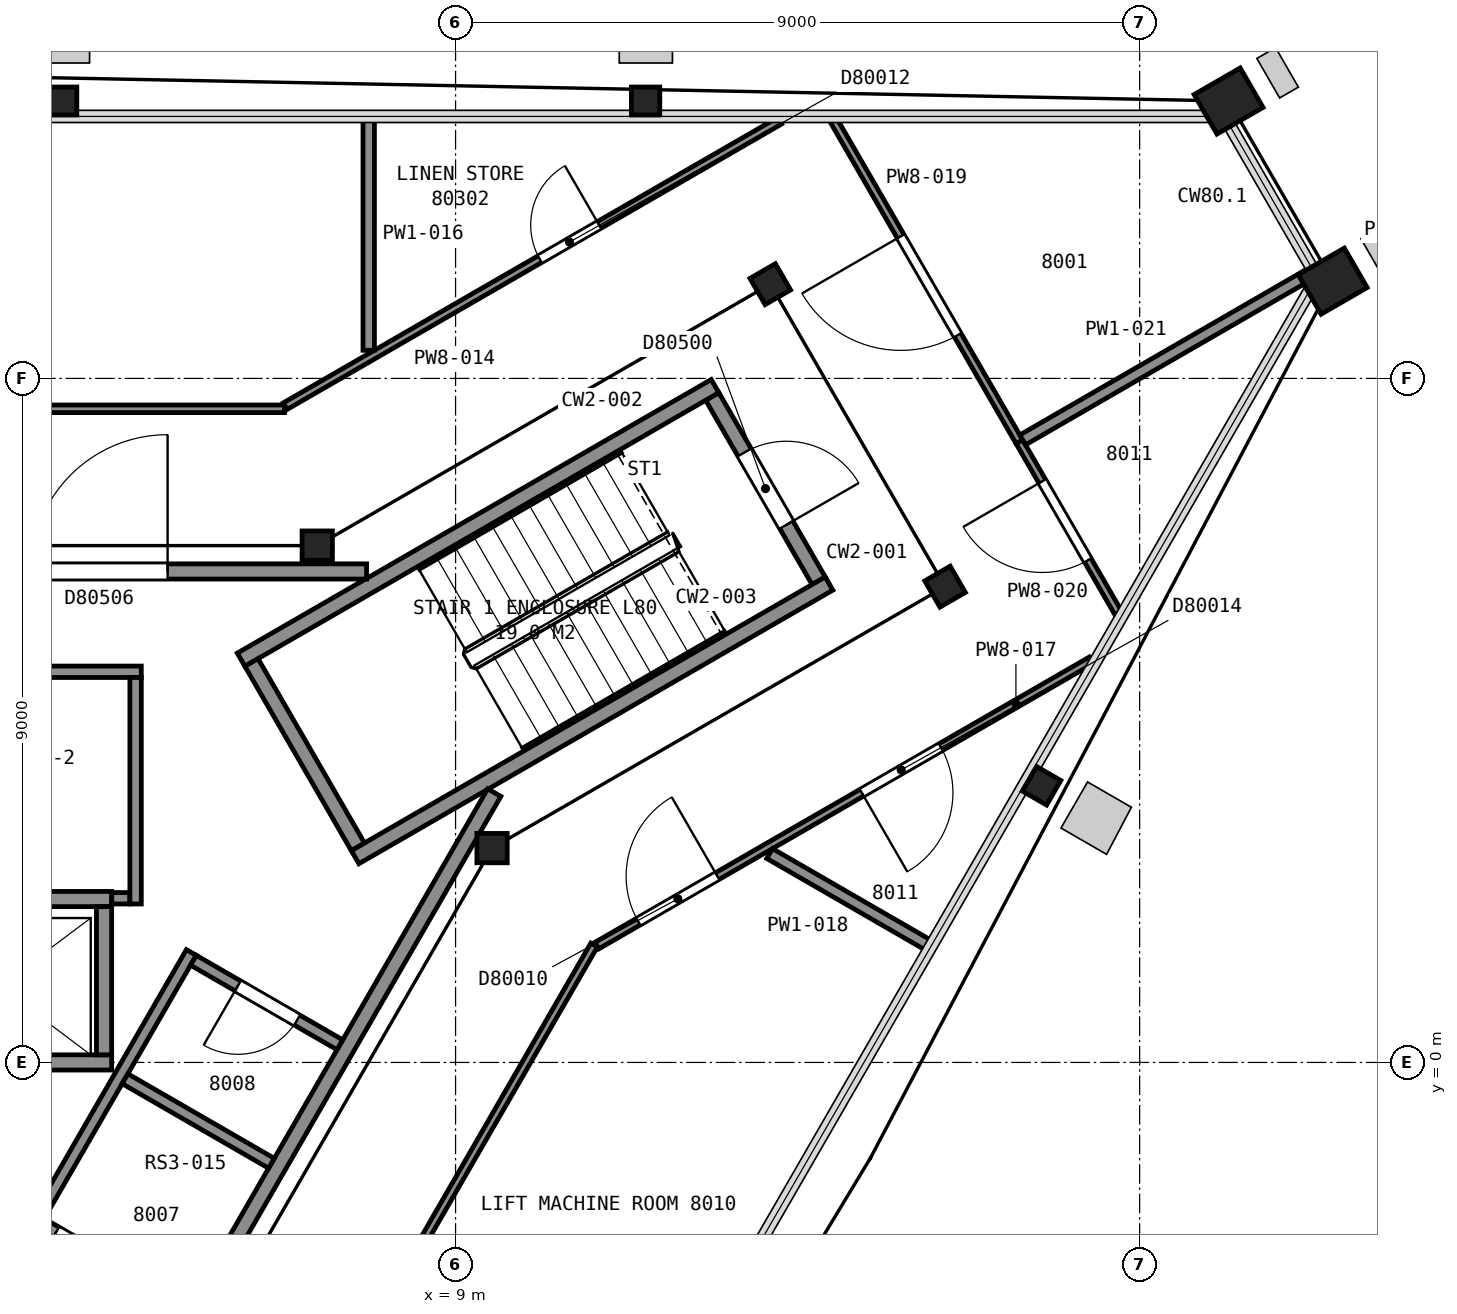
"""IFC4 building model, lengths in metres.
Left out: names, types, materials, properties, quantities, classifications, styles, units other than length and angle.
Written with IfcOpenShell. Run it as: python <this file> out.ifc"""

import sys

from ifc_helpers import new_model, si_unit, direction, frame, frame_2d, origin, origin_2d, place, context, subcontext, project, spatial, rectangle, hollow_rectangle, i_section, extrude, element, fill, save


model = new_model("IFC4")
c1 = context("Model", 3, precision=1e-05, world=origin(), true_north=direction((0.0, 1.0)))
c2 = subcontext(c1, "Body", "Model", "MODEL_VIEW")
j1 = project(units=[si_unit("LENGTHUNIT", "METRE"), si_unit("PLANEANGLEUNIT", "RADIAN")], contexts=[c1])
p1 = place(None, origin())
s1 = spatial("IfcSite", under=j1, at=p1, CompositionType="ELEMENT")
p2 = place(p1, origin())
s2 = spatial("IfcBuilding", under=s1, at=p2, CompositionType="ELEMENT")
p3 = place(p2, frame((0.0, 0.0, 316.8)))
s3 = spatial("IfcBuildingStorey", under=s2, at=p3, CompositionType="ELEMENT", Elevation=316.8)
p4 = place(p3, frame((19.17, 12.65, 0.0), z_axis=(0.0, 0.0, 1.0), x_axis=(0.5, -0.866025403784, 0.0)))
e1 = element("IfcColumn", 1, at=p4, inside=s3, PredefinedType="COLUMN", context=c2, shape_type="SweptSolid", body=[
    extrude(hollow_rectangle(XDim=0.6, YDim=0.7, WallThickness=0.04, at=origin_2d()), origin(), (0.0, 0.0, 1.0), 4.2),
])
for number, where, z_axis, x_axis in (
    (2, (11.5, 12.65, 0.0), (0.0, 0.0, 1.0), (1.0, 0.0, 0.0)),
    (3, (3.83, 12.65, 0.0), (0.0, 0.0, 1.0), (1.0, 0.0, 0.0)),
    (4, (16.71, 3.64, 0.0), (0.0, 0.0, 1.0), (-0.5, -0.866, 0.0)),
):
    element("IfcColumn", number, at=place(p3, frame(where, z_axis=z_axis, x_axis=x_axis)), inside=s3, PredefinedType="COLUMN", context=c2, shape_type="SweptSolid", body=[
        extrude(i_section(OverallWidth=0.373, OverallDepth=0.368, WebThickness=0.015, FlangeThickness=0.024, FilletRadius=0.015, at=origin_2d()), origin(), (0.0, 0.0, 1.0), 4.2),
    ])
p5 = place(p3, frame((20.54, 10.28, 0.0), z_axis=(0.0, 0.0, 1.0), x_axis=(0.5, -0.866025403784, 0.0)))
e5 = element("IfcColumn", 5, at=p5, inside=s3, PredefinedType="COLUMN", context=c2, shape_type="SweptSolid", body=[
    extrude(hollow_rectangle(XDim=0.6, YDim=0.7, WallThickness=0.04, at=origin_2d()), origin(), (0.0, 0.0, 1.0), 4.2),
])
for number, where, z_axis, x_axis in (
    (6, (9.48, 2.82, 0.0), (0.0, 0.0, 1.0), (1.0, 0.0, 0.0)),
    (7, (15.44, 6.26, 0.0), (0.0, 0.0, 1.0), (0.5, -0.866, 0.0)),
    (8, (13.14, 10.24, 0.0), (0.0, 0.0, 1.0), (0.5, -0.866, 0.0)),
    (9, (7.18, 6.8, 0.0), (0.0, 0.0, 1.0), (1.0, 0.0, 0.0)),
):
    element("IfcColumn", number, at=place(p3, frame(where, z_axis=z_axis, x_axis=x_axis)), inside=s3, PredefinedType="COLUMN", context=c2, shape_type="SweptSolid", body=[
        extrude(i_section(OverallWidth=0.399, OverallDepth=0.386, WebThickness=0.021, FlangeThickness=0.033, FilletRadius=0.015, at=origin_2d()), origin(), (0.0, 0.0, 1.0), 4.2),
    ])
p6 = place(p3, frame((13.777, 6.338, 0.0), z_axis=(0.0, 0.0, 1.0), x_axis=(-0.500049511043, 0.865996816683, 0.0)))
e10 = element("IfcWall", 10, at=p6, inside=s3, PredefinedType="PARTITIONING", context=c2, shape_type="SweptSolid", body=[
    extrude(rectangle(XDim=2.8, YDim=0.2, at=frame_2d((1.4, 0.0))), origin(), (0.0, 0.0, 1.0), 3.95),
])
p7 = place(p6, frame((0.85, 0.0, 0.0)))
e11 = element("IfcOpeningElement", 11, at=p7, cuts=e10, PredefinedType="OPENING", context=c2, shape_type="SweptSolid", body=[
    extrude(rectangle(XDim=1.1, YDim=2.1, at=frame_2d((0.55, 1.05))), frame((0.0, 0.11, 0.0), z_axis=(0.0, -1.0, 0.0), x_axis=(1.0, 0.0, 0.0)), (0.0, 0.0, 1.0), 0.22),
])
for number, where, z_axis, x_axis in (
    (12, (6.178, 5.299, 0.0), (0.0, 0.0, 1.0), (0.866, 0.5, 0.0)),
    (13, (7.678, 2.701, 0.0), (0.0, 0.0, 1.0), (0.866, 0.5, 0.0)),
):
    element("IfcWall", number, at=place(p3, frame(where, z_axis=z_axis, x_axis=x_axis)), inside=s3, PredefinedType="PARTITIONING", context=c2, shape_type="SweptSolid", body=[
        extrude(rectangle(XDim=7.2, YDim=0.2, at=frame_2d((3.6, 0.0))), origin(), (0.0, 0.0, 1.0), 3.95),
    ])
p8 = place(p3, frame((7.715, 2.838, 0.0), z_axis=(0.0, 0.0, 1.0), x_axis=(-0.500049511043, 0.865996816683, 0.0)))
e14 = element("IfcWall", 14, at=p8, inside=s3, PredefinedType="PARTITIONING", context=c2, shape_type="SweptSolid", body=[
    extrude(rectangle(XDim=2.8, YDim=0.2, at=frame_2d((1.4, 0.0))), origin(), (0.0, 0.0, 1.0), 3.95),
])
p9 = place(p3, frame((1.525, 0.0, 0.0), z_axis=(0.0, 0.0, 1.0), x_axis=(1.0, 0.0, 0.0)))
e15 = element("IfcWall", 15, at=p9, inside=s3, PredefinedType="PARTITIONING", context=c2, shape_type="SweptSolid", body=[
    extrude(rectangle(XDim=2.95, YDim=0.2, at=frame_2d((1.475, 0.0))), origin(), (0.0, 0.0, 1.0), 4.2),
])
p10 = place(p3, frame((1.525, 2.15, 0.0), z_axis=(0.0, 0.0, 1.0), x_axis=(1.0, 0.0, 0.0)))
e16 = element("IfcWall", 16, at=p10, inside=s3, PredefinedType="PARTITIONING", context=c2, shape_type="SweptSolid", body=[
    extrude(rectangle(XDim=2.95, YDim=0.2, at=frame_2d((1.475, 0.0))), origin(), (0.0, 0.0, 1.0), 4.2),
])
p11 = place(p10, frame((0.925, 0.0, 0.0)))
e17 = element("IfcOpeningElement", 17, at=p11, cuts=e16, PredefinedType="OPENING", context=c2, shape_type="SweptSolid", body=[
    extrude(rectangle(XDim=1.1, YDim=2.1, at=frame_2d((0.55, 1.05))), frame((0.0, 0.11, 0.0), z_axis=(0.0, -1.0, 0.0), x_axis=(1.0, 0.0, 0.0)), (0.0, 0.0, 1.0), 0.22),
])
p12 = place(p3, frame((4.375, 0.1, 0.0), z_axis=(0.0, 0.0, 1.0), x_axis=(0.0, 1.0, 0.0)))
e18 = element("IfcWall", 18, at=p12, inside=s3, PredefinedType="PARTITIONING", context=c2, shape_type="SweptSolid", body=[
    extrude(rectangle(XDim=1.95, YDim=0.2, at=frame_2d((0.975, 0.0))), origin(), (0.0, 0.0, 1.0), 4.2),
])
p13 = place(p3, frame((7.829, 6.46, 0.0), z_axis=(0.0, 0.0, 1.0), x_axis=(-1.0, 0.0, 0.0)))
e19 = element("IfcWall", 19, at=p13, inside=s3, PredefinedType="PARTITIONING", context=c2, shape_type="SweptSolid", body=[
    extrude(rectangle(XDim=15.658, YDim=0.2, at=frame_2d((7.829, 0.0))), origin(), (0.0, 0.0, 1.0), 3.95),
])
p14 = place(p13, frame((2.618, 0.0, 0.0)))
e20 = element("IfcOpeningElement", 20, at=p14, cuts=e19, PredefinedType="OPENING", context=c2, shape_type="SweptSolid", body=[
    extrude(rectangle(XDim=1.8, YDim=2.1, at=frame_2d((0.9, 1.05))), frame((0.0, 0.11, 0.0), z_axis=(0.0, -1.0, 0.0), x_axis=(1.0, 0.0, 0.0)), (0.0, 0.0, 1.0), 0.22),
])
p15 = place(p3, frame((-0.245, 5.14, 0.0), z_axis=(0.0, 0.0, 1.0), x_axis=(1.0, 0.0, 0.0)))
e21 = element("IfcWall", 21, at=p15, inside=s3, PredefinedType="PARTITIONING", context=c2, shape_type="SweptSolid", body=[
    extrude(rectangle(XDim=5.11, YDim=0.15, at=frame_2d((2.555, 0.0))), origin(), (0.0, 0.0, 1.0), 3.95),
])
p16 = place(p15, frame((1.975, 0.0, 0.0)))
e22 = element("IfcOpeningElement", 22, at=p16, cuts=e21, PredefinedType="OPENING", context=c2, shape_type="SweptSolid", body=[
    extrude(rectangle(XDim=1.0, YDim=2.1, at=frame_2d((0.5, 1.05))), frame((0.0, 0.085, 0.0), z_axis=(0.0, -1.0, 0.0), x_axis=(1.0, 0.0, 0.0)), (0.0, 0.0, 1.0), 0.17),
])
p17 = place(p3, frame((2.552, -8.5, 0.0), z_axis=(0.0, 0.0, 1.0), x_axis=(0.499981156672, 0.866036282712, 0.0)))
e23 = element("IfcWall", 23, at=p17, inside=s3, PredefinedType="PARTITIONING", context=c2, shape_type="SweptSolid", body=[
    extrude(rectangle(XDim=13.915, YDim=0.2, at=frame_2d((6.957, 0.0))), origin(), (0.0, 0.0, 1.0), 3.95),
])
p18 = place(p3, frame((3.448, -2.147, 0.0), z_axis=(0.0, 0.0, 1.0), x_axis=(0.499992353047, 0.86602981871, 0.0)))
e24 = element("IfcWall", 24, at=p18, inside=s3, PredefinedType="PARTITIONING", context=c2, shape_type="SweptSolid", body=[
    extrude(rectangle(XDim=4.15, YDim=0.15, at=frame_2d((2.075, 0.0))), origin(), (0.0, 0.0, 1.0), 3.95),
])
p19 = place(p3, frame((3.551, -2.119, 0.0), z_axis=(0.0, 0.0, 1.0), x_axis=(0.865944298464, -0.500140452231, 0.0)))
e25 = element("IfcWall", 25, at=p19, inside=s3, PredefinedType="PARTITIONING", context=c2, shape_type="SweptSolid", body=[
    extrude(rectangle(XDim=2.224, YDim=0.15, at=frame_2d((1.112, 0.0))), origin(), (0.0, 0.0, 1.0), 3.95),
])
p20 = place(p19, frame((0.225, 0.0, 0.0)))
e26 = element("IfcOpeningElement", 26, at=p20, cuts=e25, PredefinedType="OPENING", context=c2, shape_type="SweptSolid", body=[
    extrude(rectangle(XDim=0.9, YDim=2.1, at=frame_2d((0.45, 1.05))), frame((0.0, 0.085, 0.0), z_axis=(0.0, -1.0, 0.0), x_axis=(1.0, 0.0, 0.0)), (0.0, 0.0, 1.0), 0.17),
])
p21 = place(p3, frame((4.477, 2.16, 0.0), z_axis=(0.0, 0.0, 1.0), x_axis=(1.0, 0.0, 0.0)))
e27 = element("IfcWall", 27, at=p21, inside=s3, PredefinedType="PARTITIONING", context=c2, shape_type="SweptSolid", body=[
    extrude(rectangle(XDim=0.238, YDim=0.15, at=frame_2d((0.119, 0.0))), origin(), (0.0, 0.0, 1.0), 3.95),
])
p22 = place(p3, frame((4.651, -0.215, 0.0), z_axis=(0.0, 0.0, 1.0), x_axis=(0.866019272134, -0.50001062018, 0.0)))
e28 = element("IfcWall", 28, at=p22, inside=s3, PredefinedType="PARTITIONING", context=c2, shape_type="SweptSolid", body=[
    extrude(rectangle(XDim=2.225, YDim=0.15, at=frame_2d((1.112, 0.0))), origin(), (0.0, 0.0, 1.0), 3.95),
])
p23 = place(p3, frame((4.79, 2.085, 0.0), z_axis=(0.0, 0.0, 1.0), x_axis=(0.0, 1.0, 0.0)))
e29 = element("IfcWall", 29, at=p23, inside=s3, PredefinedType="PARTITIONING", context=c2, shape_type="SweptSolid", body=[
    extrude(rectangle(XDim=2.98, YDim=0.15, at=frame_2d((1.49, 0.0))), origin(), (0.0, 0.0, 1.0), 3.95),
])
p24 = place(p3, frame((7.477, 0.232, 0.0), z_axis=(0.0, 0.0, 1.0), x_axis=(-0.865944298464, 0.500140452231, 0.0)))
e30 = element("IfcWall", 30, at=p24, inside=s3, PredefinedType="PARTITIONING", context=c2, shape_type="SweptSolid", body=[
    extrude(rectangle(XDim=2.224, YDim=0.15, at=frame_2d((1.112, 0.0))), origin(), (0.0, 0.0, 1.0), 3.95),
])
p25 = place(p24, frame((0.65, 0.0, 0.0)))
e31 = element("IfcOpeningElement", 31, at=p25, cuts=e30, PredefinedType="OPENING", context=c2, shape_type="SweptSolid", body=[
    extrude(rectangle(XDim=0.9, YDim=2.1, at=frame_2d((0.45, 1.05))), frame((0.0, 0.085, 0.0), z_axis=(0.0, -1.0, 0.0), x_axis=(1.0, 0.0, 0.0)), (0.0, 0.0, 1.0), 0.17),
])
p26 = place(p3, frame((-6.748, 8.6, 0.0), z_axis=(0.0, 0.0, 1.0), x_axis=(1.0, 0.0, 0.0)))
e32 = element("IfcWall", 32, at=p26, inside=s3, PredefinedType="PARTITIONING", context=c2, shape_type="SweptSolid", body=[
    extrude(rectangle(XDim=13.496, YDim=0.1, at=frame_2d((6.748, 0.0))), origin(), (0.0, 0.0, 1.0), 3.297),
])
p27 = place(p26, frame((6.563, 0.0, 0.0)))
e33 = element("IfcOpeningElement", 33, at=p27, cuts=e32, PredefinedType="OPENING", context=c2, shape_type="SweptSolid", body=[
    extrude(rectangle(XDim=1.5, YDim=2.1, at=frame_2d((0.75, 1.05))), frame((0.0, 0.06, 0.0), z_axis=(0.0, -1.0, 0.0), x_axis=(1.0, 0.0, 0.0)), (0.0, 0.0, 1.0), 0.12),
])
p28 = place(p3, frame((4.075, -10.145, 0.0), z_axis=(0.0, 0.0, 1.0), x_axis=(0.499912942625, 0.866075660549, 0.0)))
e34 = element("IfcWall", 34, at=p28, inside=s3, PredefinedType="PARTITIONING", context=c2, shape_type="SweptSolid", body=[
    extrude(rectangle(XDim=13.499, YDim=0.1, at=frame_2d((6.749, 0.0))), origin(), (0.0, 0.0, 1.0), 3.297),
])
p29 = place(p3, frame((6.759, 8.635, 0.0), z_axis=(0.0, 0.0, 1.0), x_axis=(0.866073029218, 0.499917501255, 0.0)))
e35 = element("IfcWall", 35, at=p29, inside=s3, PredefinedType="PARTITIONING", context=c2, shape_type="SweptSolid", body=[
    extrude(rectangle(XDim=7.512, YDim=0.1, at=frame_2d((3.756, 0.0))), origin(), (0.0, 0.0, 1.0), 3.297),
])
p30 = place(p29, frame((3.868, 0.0, 0.0)))
e36 = element("IfcOpeningElement", 36, at=p30, cuts=e35, PredefinedType="OPENING", context=c2, shape_type="SweptSolid", body=[
    extrude(rectangle(XDim=0.9, YDim=2.1, at=frame_2d((0.45, 1.05))), frame((0.0, 0.06, 0.0), z_axis=(0.0, -1.0, 0.0), x_axis=(1.0, 0.0, 0.0)), (0.0, 0.0, 1.0), 0.12),
])
p31 = place(p3, frame((7.857, 9.37, 0.0), z_axis=(0.0, 0.0, 1.0), x_axis=(0.0, 1.0, 0.0)))
e37 = element("IfcWall", 37, at=p31, inside=s3, PredefinedType="PARTITIONING", context=c2, shape_type="SweptSolid", body=[
    extrude(rectangle(XDim=3.063, YDim=0.15, at=frame_2d((1.531, 0.0))), origin(), (0.0, 0.0, 1.0), 3.297),
])
p32 = place(p3, frame((17.361, 5.29, 0.0), z_axis=(0.0, 0.0, 1.0), x_axis=(-0.866105995393, -0.499860385252, 0.0)))
e38 = element("IfcWall", 38, at=p32, inside=s3, PredefinedType="PARTITIONING", context=c2, shape_type="SweptSolid", body=[
    extrude(rectangle(XDim=7.508, YDim=0.1, at=frame_2d((3.754, 0.0))), origin(), (0.0, 0.0, 1.0), 3.297),
])
p33 = place(p32, frame((5.678, 0.0, 0.0)))
e39 = element("IfcOpeningElement", 39, at=p33, cuts=e38, PredefinedType="OPENING", context=c2, shape_type="SweptSolid", body=[
    extrude(rectangle(XDim=1.2, YDim=2.1, at=frame_2d((0.6, 1.05))), frame((0.0, 0.06, 0.0), z_axis=(0.0, -1.0, 0.0), x_axis=(1.0, 0.0, 0.0)), (0.0, 0.0, 1.0), 0.12),
])
p34 = place(p32, frame((2.284, 0.0, 0.0)))
e40 = element("IfcOpeningElement", 40, at=p34, cuts=e38, PredefinedType="OPENING", context=c2, shape_type="SweptSolid", body=[
    extrude(rectangle(XDim=1.2, YDim=2.1, at=frame_2d((0.6, 1.05))), frame((0.0, 0.06, 0.0), z_axis=(0.0, -1.0, 0.0), x_axis=(1.0, 0.0, 0.0)), (0.0, 0.0, 1.0), 0.12),
])
p35 = place(p3, frame((13.132, 2.749, 0.0), z_axis=(0.0, 0.0, 1.0), x_axis=(0.86593842012, -0.50015062987, 0.0)))
e41 = element("IfcWall", 41, at=p35, inside=s3, PredefinedType="PARTITIONING", context=c2, shape_type="SweptSolid", body=[
    extrude(rectangle(XDim=2.435, YDim=0.15, at=frame_2d((1.217, 0.0))), origin(), (0.0, 0.0, 1.0), 3.297),
])
p36 = place(p3, frame((13.966, 12.408, 0.0), z_axis=(0.0, 0.0, 1.0), x_axis=(0.500399645014, -0.865794545646, 0.0)))
e42 = element("IfcWall", 42, at=p36, inside=s3, PredefinedType="PARTITIONING", context=c2, shape_type="SweptSolid", body=[
    extrude(rectangle(XDim=4.899, YDim=0.1, at=frame_2d((2.449, 0.0))), origin(), (0.0, 0.0, 1.0), 3.297),
])
p37 = place(p36, frame((1.779, 0.0, 0.0)))
e43 = element("IfcOpeningElement", 43, at=p37, cuts=e42, PredefinedType="OPENING", context=c2, shape_type="SweptSolid", body=[
    extrude(rectangle(XDim=1.5, YDim=2.1, at=frame_2d((0.75, 1.05))), frame((0.0, 0.06, 0.0), z_axis=(0.0, -1.0, 0.0), x_axis=(1.0, 0.0, 0.0)), (0.0, 0.0, 1.0), 0.12),
])
p38 = place(p3, frame((16.418, 8.166, 0.0), z_axis=(0.0, 0.0, 1.0), x_axis=(0.500141194934, -0.865943869503, 0.0)))
e44 = element("IfcWall", 44, at=p38, inside=s3, PredefinedType="PARTITIONING", context=c2, shape_type="SweptSolid", body=[
    extrude(rectangle(XDim=2.624, YDim=0.1, at=frame_2d((1.312, 0.0))), origin(), (0.0, 0.0, 1.0), 3.297),
])
p39 = place(p38, frame((0.6, 0.0, 0.0)))
e45 = element("IfcOpeningElement", 45, at=p39, cuts=e44, PredefinedType="OPENING", context=c2, shape_type="SweptSolid", body=[
    extrude(rectangle(XDim=1.2, YDim=2.1, at=frame_2d((0.6, 1.05))), frame((0.0, 0.06, 0.0), z_axis=(0.0, -1.0, 0.0), x_axis=(1.0, 0.0, 0.0)), (0.0, 0.0, 1.0), 0.12),
])
p40 = place(p3, frame((16.461, 8.191, 0.0), z_axis=(0.0, 0.0, 1.0), x_axis=(0.865849090599, 0.500305259125, 0.0)))
e46 = element("IfcWall", 46, at=p40, inside=s3, PredefinedType="PARTITIONING", context=c2, shape_type="SweptSolid", body=[
    extrude(rectangle(XDim=4.411, YDim=0.15, at=frame_2d((2.206, 0.0))), origin(), (0.0, 0.0, 1.0), 3.297),
])
p41 = place(p7, origin())
e47 = element("IfcDoor", 47, at=p41, inside=s3, OperationType="SINGLE_SWING_LEFT", PredefinedType="DOOR", context=c2, shape_type="SweptSolid", body=[
    extrude(rectangle(XDim=1.1, YDim=2.1, at=frame_2d((0.55, 1.05))), frame((0.0, 0.025, 0.0), z_axis=(0.0, -1.0, 0.0), x_axis=(1.0, 0.0, 0.0)), (0.0, 0.0, 1.0), 0.05),
])
fill(e11, e47)
p42 = place(p14, origin())
e48 = element("IfcDoor", 48, at=p42, inside=s3, OperationType="DOUBLE_DOOR_SINGLE_SWING", PredefinedType="DOOR", context=c2, shape_type="SweptSolid", body=[
    extrude(rectangle(XDim=1.8, YDim=2.1, at=frame_2d((0.9, 1.05))), frame((0.0, 0.025, 0.0), z_axis=(0.0, -1.0, 0.0), x_axis=(1.0, 0.0, 0.0)), (0.0, 0.0, 1.0), 0.05),
])
fill(e20, e48)
p43 = place(p20, origin())
e49 = element("IfcDoor", 49, at=p43, inside=s3, OperationType="SINGLE_SWING_LEFT", PredefinedType="DOOR", context=c2, shape_type="SweptSolid", body=[
    extrude(rectangle(XDim=0.9, YDim=2.1, at=frame_2d((0.45, 1.05))), frame((0.0, 0.025, 0.0), z_axis=(0.0, -1.0, 0.0), x_axis=(1.0, 0.0, 0.0)), (0.0, 0.0, 1.0), 0.05),
])
fill(e26, e49)
p44 = place(p25, origin())
e50 = element("IfcDoor", 50, at=p44, inside=s3, OperationType="SINGLE_SWING_RIGHT", PredefinedType="DOOR", context=c2, shape_type="SweptSolid", body=[
    extrude(rectangle(XDim=0.9, YDim=2.1, at=frame_2d((0.45, 1.05))), frame((0.0, 0.025, 0.0), z_axis=(0.0, -1.0, 0.0), x_axis=(1.0, 0.0, 0.0)), (0.0, 0.0, 1.0), 0.05),
])
fill(e31, e50)
p45 = place(p30, origin())
e51 = element("IfcDoor", 51, at=p45, inside=s3, OperationType="SINGLE_SWING_RIGHT", PredefinedType="DOOR", context=c2, shape_type="SweptSolid", body=[
    extrude(rectangle(XDim=0.9, YDim=2.1, at=frame_2d((0.45, 1.05))), frame((0.0, 0.025, 0.0), z_axis=(0.0, -1.0, 0.0), x_axis=(1.0, 0.0, 0.0)), (0.0, 0.0, 1.0), 0.05),
])
fill(e36, e51)
p46 = place(p33, origin())
e52 = element("IfcDoor", 52, at=p46, inside=s3, OperationType="SINGLE_SWING_LEFT", PredefinedType="DOOR", context=c2, shape_type="SweptSolid", body=[
    extrude(rectangle(XDim=1.2, YDim=2.1, at=frame_2d((0.6, 1.05))), frame((0.0, 0.025, 0.0), z_axis=(0.0, -1.0, 0.0), x_axis=(1.0, 0.0, 0.0)), (0.0, 0.0, 1.0), 0.05),
])
fill(e39, e52)
p47 = place(p34, origin())
e53 = element("IfcDoor", 53, at=p47, inside=s3, OperationType="SINGLE_SWING_RIGHT", PredefinedType="DOOR", context=c2, shape_type="SweptSolid", body=[
    extrude(rectangle(XDim=1.2, YDim=2.1, at=frame_2d((0.6, 1.05))), frame((0.0, 0.025, 0.0), z_axis=(0.0, -1.0, 0.0), x_axis=(1.0, 0.0, 0.0)), (0.0, 0.0, 1.0), 0.05),
])
fill(e40, e53)
p48 = place(p37, origin())
e54 = element("IfcDoor", 54, at=p48, inside=s3, OperationType="DOUBLE_DOOR_SINGLE_SWING", PredefinedType="DOOR", context=c2, shape_type="SweptSolid", body=[
    extrude(rectangle(XDim=1.5, YDim=2.1, at=frame_2d((0.75, 1.05))), frame((0.0, 0.025, 0.0), z_axis=(0.0, -1.0, 0.0), x_axis=(1.0, 0.0, 0.0)), (0.0, 0.0, 1.0), 0.05),
])
fill(e43, e54)
p49 = place(p39, origin())
e55 = element("IfcDoor", 55, at=p49, inside=s3, OperationType="SINGLE_SWING_LEFT", PredefinedType="DOOR", context=c2, shape_type="SweptSolid", body=[
    extrude(rectangle(XDim=1.2, YDim=2.1, at=frame_2d((0.6, 1.05))), frame((0.0, 0.025, 0.0), z_axis=(0.0, -1.0, 0.0), x_axis=(1.0, 0.0, 0.0)), (0.0, 0.0, 1.0), 0.05),
])
fill(e45, e55)
save(model, sys.argv[1])
